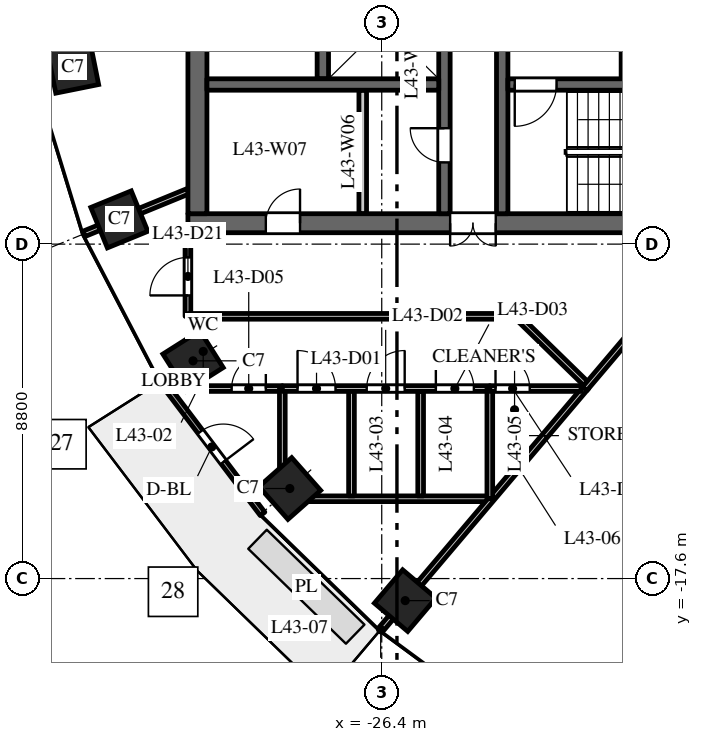
"""IFC4 building model, lengths in metres.
Left out: names, types, materials, properties, quantities, classifications, styles, units other than length and angle.
Written with IfcOpenShell. Run it as: python <this file> out.ifc"""

import sys

from ifc_helpers import new_model, si_unit, direction, frame, frame_2d, origin, origin_2d, place, context, subcontext, project, spatial, rectangle, extrude, element, fill, save


model = new_model("IFC4")
c1 = context("Model", 3, precision=1e-05, world=origin(), true_north=direction((0.0, 1.0)))
c2 = subcontext(c1, "Body", "Model", "MODEL_VIEW")
j1 = project(units=[si_unit("LENGTHUNIT", "METRE"), si_unit("PLANEANGLEUNIT", "RADIAN")], contexts=[c1])
p1 = place(None, origin())
s1 = spatial("IfcSite", under=j1, at=p1, CompositionType="ELEMENT")
p2 = place(p1, origin())
s2 = spatial("IfcBuilding", under=s1, at=p2, CompositionType="ELEMENT")
p3 = place(p2, frame((0.0, 0.0, 186.0)))
s3 = spatial("IfcBuildingStorey", under=s2, at=p3, CompositionType="ELEMENT", Elevation=186.0)
for number, where, z_axis, x_axis in (
    (1, (-34.527, -4.151, 0.0), (0.0, 0.0, 1.0), (0.197, -0.98, 0.0)),
    (2, (-33.305, -8.149, 0.0), (0.0, 0.0, 1.0), (0.379, -0.925, 0.0)),
    (3, (-31.365, -11.871, 0.0), (0.0, 0.0, 1.0), (0.535, -0.845, 0.0)),
    (4, (-28.819, -15.23, 0.0), (0.0, 0.0, 1.0), (0.663, -0.749, 0.0)),
    (5, (-25.783, -18.18, 0.0), (0.0, 0.0, 1.0), (0.763, -0.646, 0.0)),
):
    element("IfcColumn", number, at=place(p3, frame(where, z_axis=z_axis, x_axis=x_axis)), inside=s3, PredefinedType="COLUMN", context=c2, shape_type="SweptSolid", body=[
        extrude(rectangle(XDim=1.15, YDim=1.15, at=origin_2d()), origin(), (0.0, 0.0, 1.0), 4.0),
    ])
p4 = place(p3, frame((-16.5, -8.25, 0.0), z_axis=(0.0, 0.0, 1.0), x_axis=(-1.0, 0.0, 0.0)))
e6 = element("IfcWall", 6, at=p4, inside=s3, PredefinedType="SHEAR", context=c2, shape_type="SweptSolid", body=[
    extrude(rectangle(XDim=15.0, YDim=0.5, at=frame_2d((7.5, 0.0))), origin(), (0.0, 0.0, 1.0), 3.7),
])
p5 = place(p4, frame((6.9, 0.0, 0.0)))
e7 = element("IfcOpeningElement", 7, at=p5, cuts=e6, PredefinedType="OPENING", context=c2, shape_type="SweptSolid", body=[
    extrude(rectangle(XDim=1.2, YDim=2.1, at=frame_2d((0.6, 1.05))), frame((0.0, 0.26, 0.0), z_axis=(0.0, -1.0, 0.0), x_axis=(1.0, 0.0, 0.0)), (0.0, 0.0, 1.0), 0.52),
])
p6 = place(p4, frame((12.05, 0.0, 0.0)))
e8 = element("IfcOpeningElement", 8, at=p6, cuts=e6, PredefinedType="OPENING", context=c2, shape_type="SweptSolid", body=[
    extrude(rectangle(XDim=0.9, YDim=2.1, at=frame_2d((0.45, 1.05))), frame((0.0, 0.26, 0.0), z_axis=(0.0, -1.0, 0.0), x_axis=(1.0, 0.0, 0.0)), (0.0, 0.0, 1.0), 0.52),
])
p7 = place(p3, frame((-27.95, -4.45, 0.0), z_axis=(0.0, 0.0, 1.0), x_axis=(0.0, 1.0, 0.0)))
e9 = element("IfcWall", 9, at=p7, inside=s3, PredefinedType="SHEAR", context=c2, shape_type="SweptSolid", body=[
    extrude(rectangle(XDim=8.9, YDim=0.3, at=frame_2d((4.45, 0.0))), origin(), (0.0, 0.0, 1.0), 3.7),
])
p8 = place(p3, frame((-19.95, -4.45, 0.0), z_axis=(0.0, 0.0, 1.0), x_axis=(0.0, 1.0, 0.0)))
e10 = element("IfcWall", 10, at=p8, inside=s3, PredefinedType="SHEAR", context=c2, shape_type="SweptSolid", body=[
    extrude(rectangle(XDim=8.9, YDim=0.3, at=frame_2d((4.45, 0.0))), origin(), (0.0, 0.0, 1.0), 3.7),
])
p9 = place(p8, frame((0.775, 0.0, 0.0)))
e11 = element("IfcOpeningElement", 11, at=p9, cuts=e10, PredefinedType="OPENING", context=c2, shape_type="SweptSolid", body=[
    extrude(rectangle(XDim=1.2, YDim=2.1, at=frame_2d((0.6, 1.05))), frame((0.0, 0.16, 0.0), z_axis=(0.0, -1.0, 0.0), x_axis=(1.0, 0.0, 0.0)), (0.0, 0.0, 1.0), 0.32),
])
p10 = place(p8, frame((7.25, 0.0, 0.0)))
e12 = element("IfcOpeningElement", 12, at=p10, cuts=e10, PredefinedType="OPENING", context=c2, shape_type="SweptSolid", body=[
    extrude(rectangle(XDim=1.1, YDim=2.1, at=frame_2d((0.55, 1.05))), frame((0.0, 0.16, 0.0), z_axis=(0.0, -1.0, 0.0), x_axis=(1.0, 0.0, 0.0)), (0.0, 0.0, 1.0), 0.32),
])
p11 = place(p3, frame((-24.75, -8.0, 0.0), z_axis=(0.0, 0.0, 1.0), x_axis=(0.0, 1.0, 0.0)))
e13 = element("IfcWall", 13, at=p11, inside=s3, PredefinedType="SHEAR", context=c2, shape_type="SweptSolid", body=[
    extrude(rectangle(XDim=16.0, YDim=0.3, at=frame_2d((8.0, 0.0))), origin(), (0.0, 0.0, 1.0), 3.7),
])
p12 = place(p11, frame((4.425, 0.0, 0.0)))
e14 = element("IfcOpeningElement", 14, at=p12, cuts=e13, PredefinedType="OPENING", context=c2, shape_type="SweptSolid", body=[
    extrude(rectangle(XDim=1.1, YDim=2.1, at=frame_2d((0.55, 1.05))), frame((0.0, 0.16, 0.0), z_axis=(0.0, -1.0, 0.0), x_axis=(1.0, 0.0, 0.0)), (0.0, 0.0, 1.0), 0.32),
])
p13 = place(p11, frame((7.45, 0.0, 0.0)))
e15 = element("IfcOpeningElement", 15, at=p13, cuts=e13, PredefinedType="OPENING", context=c2, shape_type="SweptSolid", body=[
    extrude(rectangle(XDim=1.1, YDim=2.1, at=frame_2d((0.55, 1.05))), frame((0.0, 0.16, 0.0), z_axis=(0.0, -1.0, 0.0), x_axis=(1.0, 0.0, 0.0)), (0.0, 0.0, 1.0), 0.32),
])
p14 = place(p11, frame((10.475, 0.0, 0.0)))
e16 = element("IfcOpeningElement", 16, at=p14, cuts=e13, PredefinedType="OPENING", context=c2, shape_type="SweptSolid", body=[
    extrude(rectangle(XDim=1.1, YDim=2.1, at=frame_2d((0.55, 1.05))), frame((0.0, 0.16, 0.0), z_axis=(0.0, -1.0, 0.0), x_axis=(1.0, 0.0, 0.0)), (0.0, 0.0, 1.0), 0.32),
])
p15 = place(p11, frame((13.75, 0.0, 0.0)))
e17 = element("IfcOpeningElement", 17, at=p15, cuts=e13, PredefinedType="OPENING", context=c2, shape_type="SweptSolid", body=[
    extrude(rectangle(XDim=0.9, YDim=2.1, at=frame_2d((0.45, 1.05))), frame((0.0, 0.16, 0.0), z_axis=(0.0, -1.0, 0.0), x_axis=(1.0, 0.0, 0.0)), (0.0, 0.0, 1.0), 0.32),
])
p16 = place(p11, frame((1.35, 0.0, 0.0)))
e18 = element("IfcOpeningElement", 18, at=p16, cuts=e13, PredefinedType="OPENING", context=c2, shape_type="SweptSolid", body=[
    extrude(rectangle(XDim=0.9, YDim=2.1, at=frame_2d((0.45, 1.05))), frame((0.0, 0.16, 0.0), z_axis=(0.0, -1.0, 0.0), x_axis=(1.0, 0.0, 0.0)), (0.0, 0.0, 1.0), 0.32),
])
p17 = place(p3, frame((-31.25, -8.0, 0.0), z_axis=(0.0, 0.0, 1.0), x_axis=(0.0, 1.0, 0.0)))
e19 = element("IfcWall", 19, at=p17, inside=s3, PredefinedType="SHEAR", context=c2, shape_type="SweptSolid", body=[
    extrude(rectangle(XDim=16.0, YDim=0.5, at=frame_2d((8.0, 0.0))), origin(), (0.0, 0.0, 1.0), 3.7),
])
p18 = place(p3, frame((-26.9, -8.0, 0.0), z_axis=(0.0, 0.0, 1.0), x_axis=(0.0, 1.0, 0.0)))
e20 = element("IfcWall", 20, at=p18, inside=s3, PredefinedType="PARTITIONING", context=c2, shape_type="SweptSolid", body=[
    extrude(rectangle(XDim=3.25, YDim=0.2, at=frame_2d((1.625, 0.0))), origin(), (0.0, 0.0, 1.0), 3.7),
])
p19 = place(p3, frame((-24.9, -4.6, 0.0), z_axis=(0.0, 0.0, 1.0), x_axis=(-1.0, 0.0, 0.0)))
e21 = element("IfcWall", 21, at=p19, inside=s3, PredefinedType="SHEAR", context=c2, shape_type="SweptSolid", body=[
    extrude(rectangle(XDim=6.1, YDim=0.3, at=frame_2d((3.05, 0.0))), origin(), (0.0, 0.0, 1.0), 3.7),
])
p20 = place(p3, frame((-23.23, -8.0, 0.0), z_axis=(0.0, 0.0, 1.0), x_axis=(0.0, 1.0, 0.0)))
e22 = element("IfcWall", 22, at=p20, inside=s3, PredefinedType="SHEAR", context=c2, shape_type="SweptSolid", body=[
    extrude(rectangle(XDim=7.875, YDim=0.3, at=frame_2d((3.938, 0.0))), origin(), (0.0, 0.0, 1.0), 3.7),
])
p21 = place(p20, frame((5.15, 0.0, 0.0)))
e23 = element("IfcOpeningElement", 23, at=p21, cuts=e22, PredefinedType="OPENING", context=c2, shape_type="SweptSolid", body=[
    extrude(rectangle(XDim=1.1, YDim=2.1, at=frame_2d((0.55, 1.05))), frame((0.0, 0.16, 0.0), z_axis=(0.0, -1.0, 0.0), x_axis=(1.0, 0.0, 0.0)), (0.0, 0.0, 1.0), 0.32),
])
p22 = place(p3, frame((-16.9, -4.6, 0.0), z_axis=(0.0, 0.0, 1.0), x_axis=(-1.0, 0.0, 0.0)))
e24 = element("IfcWall", 24, at=p22, inside=s3, PredefinedType="SHEAR", context=c2, shape_type="SweptSolid", body=[
    extrude(rectangle(XDim=6.18, YDim=0.3, at=frame_2d((3.09, 0.0))), origin(), (0.0, 0.0, 1.0), 3.7),
])
p23 = place(p22, frame((4.9, 0.0, 0.0)))
e25 = element("IfcOpeningElement", 25, at=p23, cuts=e24, PredefinedType="OPENING", context=c2, shape_type="SweptSolid", body=[
    extrude(rectangle(XDim=1.1, YDim=2.1, at=frame_2d((0.55, 1.05))), frame((0.0, 0.16, 0.0), z_axis=(0.0, -1.0, 0.0), x_axis=(1.0, 0.0, 0.0)), (0.0, 0.0, 1.0), 0.32),
])
p24 = place(p3, frame((-32.208, -12.374, 0.0), z_axis=(0.0, 0.0, 1.0), x_axis=(0.604045763106, -0.796949632081, 0.0)))
e26 = element("IfcWall", 26, at=p24, inside=s3, PredefinedType="STANDARD", context=c2, shape_type="SweptSolid", body=[
    extrude(rectangle(XDim=4.423, YDim=0.15, at=frame_2d((2.212, 0.0))), origin(), (0.0, 0.0, 1.0), 3.7),
])
p25 = place(p24, frame((1.712, 0.0, 0.0)))
e27 = element("IfcOpeningElement", 27, at=p25, cuts=e26, PredefinedType="OPENING", context=c2, shape_type="SweptSolid", body=[
    extrude(rectangle(XDim=1.0, YDim=2.4, at=frame_2d((0.5, 1.2))), frame((0.0, 0.085, 0.0), z_axis=(0.0, -1.0, 0.0), x_axis=(1.0, 0.0, 0.0)), (0.0, 0.0, 1.0), 0.17),
])
p26 = place(p3, frame((-34.234, -8.53, 0.0), z_axis=(0.0, 0.0, 1.0), x_axis=(0.925344112436, 0.379128307542, 0.0)))
e28 = element("IfcWall", 28, at=p26, inside=s3, PredefinedType="PARTITIONING", context=c2, shape_type="SweptSolid", body=[
    extrude(rectangle(XDim=2.954, YDim=0.15, at=frame_2d((1.477, 0.0))), origin(), (0.0, 0.0, 1.0), 2.9),
])
p27 = place(p3, frame((-32.063, -12.6, 0.0), z_axis=(0.0, 0.0, 1.0), x_axis=(1.0, 0.0, 0.0)))
e29 = element("IfcWall", 29, at=p27, inside=s3, PredefinedType="PARTITIONING", context=c2, shape_type="SweptSolid", body=[
    extrude(rectangle(XDim=3.047, YDim=0.15, at=frame_2d((1.523, 0.0))), origin(), (0.0, 0.0, 1.0), 2.9),
])
p28 = place(p27, frame((1.713, 0.0, 0.0)))
e30 = element("IfcOpeningElement", 30, at=p28, cuts=e29, PredefinedType="OPENING", context=c2, shape_type="SweptSolid", body=[
    extrude(rectangle(XDim=0.9, YDim=2.1, at=frame_2d((0.45, 1.05))), frame((0.0, 0.085, 0.0), z_axis=(0.0, -1.0, 0.0), x_axis=(1.0, 0.0, 0.0)), (0.0, 0.0, 1.0), 0.17),
])
p29 = place(p3, frame((-31.5, -10.7, 0.0), z_axis=(0.0, 0.0, 1.0), x_axis=(0.0, 1.0, 0.0)))
e31 = element("IfcWall", 31, at=p29, inside=s3, PredefinedType="PARTITIONING", context=c2, shape_type="SweptSolid", body=[
    extrude(rectangle(XDim=2.2, YDim=0.15, at=frame_2d((1.1, 0.0))), origin(), (0.0, 0.0, 1.0), 3.7),
])
p30 = place(p29, frame((0.55, 0.0, 0.0)))
e32 = element("IfcOpeningElement", 32, at=p30, cuts=e31, PredefinedType="OPENING", context=c2, shape_type="SweptSolid", body=[
    extrude(rectangle(XDim=1.0, YDim=2.1, at=frame_2d((0.5, 1.05))), frame((0.0, 0.085, 0.0), z_axis=(0.0, -1.0, 0.0), x_axis=(1.0, 0.0, 0.0)), (0.0, 0.0, 1.0), 0.17),
])
p31 = place(p3, frame((-31.5, -10.7, 0.0), z_axis=(0.0, 0.0, 1.0), x_axis=(1.0, 0.0, 0.0)))
e33 = element("IfcWall", 33, at=p31, inside=s3, PredefinedType="PARTITIONING", context=c2, shape_type="SweptSolid", body=[
    extrude(rectangle(XDim=8.762, YDim=0.15, at=frame_2d((4.381, 0.0))), origin(), (0.0, 0.0, 1.0), 3.1),
])
p32 = place(p3, frame((-29.016, -15.496, 0.0), z_axis=(0.0, 0.0, 1.0), x_axis=(0.0, 1.0, 0.0)))
e34 = element("IfcWall", 34, at=p32, inside=s3, PredefinedType="PARTITIONING", context=c2, shape_type="SweptSolid", body=[
    extrude(rectangle(XDim=2.896, YDim=0.15, at=frame_2d((1.448, 0.0))), origin(), (0.0, 0.0, 1.0), 2.9),
])
p33 = place(p3, frame((-29.016, -12.6, 0.0), z_axis=(0.0, 0.0, 1.0), x_axis=(1.0, 0.0, 0.0)))
e35 = element("IfcWall", 35, at=p33, inside=s3, PredefinedType="PARTITIONING", context=c2, shape_type="SweptSolid", body=[
    extrude(rectangle(XDim=5.46, YDim=0.15, at=frame_2d((2.73, 0.0))), origin(), (0.0, 0.0, 1.0), 3.7),
])
p34 = place(p33, frame((0.4, 0.0, 0.0)))
e36 = element("IfcOpeningElement", 36, at=p34, cuts=e35, PredefinedType="OPENING", context=c2, shape_type="SweptSolid", body=[
    extrude(rectangle(XDim=1.0, YDim=2.1, at=frame_2d((0.5, 1.05))), frame((0.0, 0.085, 0.0), z_axis=(0.0, -1.0, 0.0), x_axis=(1.0, 0.0, 0.0)), (0.0, 0.0, 1.0), 0.17),
])
p35 = place(p33, frame((2.22, 0.0, 0.0)))
e37 = element("IfcOpeningElement", 37, at=p35, cuts=e35, PredefinedType="OPENING", context=c2, shape_type="SweptSolid", body=[
    extrude(rectangle(XDim=1.0, YDim=2.1, at=frame_2d((0.5, 1.05))), frame((0.0, 0.085, 0.0), z_axis=(0.0, -1.0, 0.0), x_axis=(1.0, 0.0, 0.0)), (0.0, 0.0, 1.0), 0.17),
])
p36 = place(p33, frame((4.04, 0.0, 0.0)))
e38 = element("IfcOpeningElement", 38, at=p36, cuts=e35, PredefinedType="OPENING", context=c2, shape_type="SweptSolid", body=[
    extrude(rectangle(XDim=1.0, YDim=2.1, at=frame_2d((0.5, 1.05))), frame((0.0, 0.085, 0.0), z_axis=(0.0, -1.0, 0.0), x_axis=(1.0, 0.0, 0.0)), (0.0, 0.0, 1.0), 0.17),
])
p37 = place(p3, frame((-29.012, -15.5, 0.0), z_axis=(0.0, 0.0, 1.0), x_axis=(1.0, 0.0, 0.0)))
e39 = element("IfcWall", 39, at=p37, inside=s3, PredefinedType="PARTITIONING", context=c2, shape_type="SweptSolid", body=[
    extrude(rectangle(XDim=5.456, YDim=0.15, at=frame_2d((2.728, 0.0))), origin(), (0.0, 0.0, 1.0), 2.9),
])
p38 = place(p3, frame((-27.196, -15.425, 0.0), z_axis=(0.0, 0.0, 1.0), x_axis=(0.0, 1.0, 0.0)))
e40 = element("IfcWall", 40, at=p38, inside=s3, PredefinedType="PARTITIONING", context=c2, shape_type="SweptSolid", body=[
    extrude(rectangle(XDim=2.75, YDim=0.15, at=frame_2d((1.375, 0.0))), origin(), (0.0, 0.0, 1.0), 3.7),
])
p39 = place(p3, frame((-26.428, -18.946, 0.0), z_axis=(0.0, 0.0, 1.0), x_axis=(0.646259235329, 0.763117946816, 0.0)))
e41 = element("IfcWall", 41, at=p39, inside=s3, PredefinedType="PARTITIONING", context=c2, shape_type="SweptSolid", body=[
    extrude(rectangle(XDim=8.388, YDim=0.15, at=frame_2d((4.194, 0.0))), origin(), (0.0, 0.0, 1.0), 2.75),
])
p40 = place(p3, frame((-25.376, -15.425, 0.0), z_axis=(0.0, 0.0, 1.0), x_axis=(0.0, 1.0, 0.0)))
e42 = element("IfcWall", 42, at=p40, inside=s3, PredefinedType="PARTITIONING", context=c2, shape_type="SweptSolid", body=[
    extrude(rectangle(XDim=2.75, YDim=0.15, at=frame_2d((1.375, 0.0))), origin(), (0.0, 0.0, 1.0), 3.7),
])
p41 = place(p3, frame((-23.556, -15.5, 0.0), z_axis=(0.0, 0.0, 1.0), x_axis=(0.0, 1.0, 0.0)))
e43 = element("IfcWall", 43, at=p41, inside=s3, PredefinedType="PARTITIONING", context=c2, shape_type="SweptSolid", body=[
    extrude(rectangle(XDim=2.9, YDim=0.15, at=frame_2d((1.45, 0.0))), origin(), (0.0, 0.0, 1.0), 3.7),
])
p42 = place(p3, frame((-23.556, -12.6, 0.0), z_axis=(0.0, 0.0, 1.0), x_axis=(1.0, 0.0, 0.0)))
e44 = element("IfcWall", 44, at=p42, inside=s3, PredefinedType="PARTITIONING", context=c2, shape_type="SweptSolid", body=[
    extrude(rectangle(XDim=2.4, YDim=0.15, at=frame_2d((1.2, 0.0))), origin(), (0.0, 0.0, 1.0), 3.7),
])
p43 = place(p42, frame((0.15, 0.0, 0.0)))
e45 = element("IfcOpeningElement", 45, at=p43, cuts=e44, PredefinedType="OPENING", context=c2, shape_type="SweptSolid", body=[
    extrude(rectangle(XDim=0.9, YDim=2.1, at=frame_2d((0.45, 1.05))), frame((0.0, 0.085, 0.0), z_axis=(0.0, -1.0, 0.0), x_axis=(1.0, 0.0, 0.0)), (0.0, 0.0, 1.0), 0.17),
])
p44 = place(p3, frame((-22.765, -10.778, 0.0), z_axis=(0.0, 0.0, 1.0), x_axis=(0.716199777284, -0.69789532096, 0.0)))
e46 = element("IfcWall", 46, at=p44, inside=s3, PredefinedType="PARTITIONING", context=c2, shape_type="SweptSolid", body=[
    extrude(rectangle(XDim=2.414, YDim=0.15, at=frame_2d((1.207, 0.0))), origin(), (0.0, 0.0, 1.0), 3.7),
])
p45 = place(p3, frame((-21.058, -12.605, 0.0), z_axis=(0.0, 0.0, 1.0), x_axis=(0.646427819344, 0.762975146632, 0.0)))
e47 = element("IfcWall", 47, at=p45, inside=s3, PredefinedType="PARTITIONING", context=c2, shape_type="SweptSolid", body=[
    extrude(rectangle(XDim=2.591, YDim=0.15, at=frame_2d((1.296, 0.0))), origin(), (0.0, 0.0, 1.0), 3.7),
])
p46 = place(p23, origin())
e48 = element("IfcDoor", 48, at=p46, inside=s3, OperationType="SINGLE_SWING_LEFT", PredefinedType="DOOR", context=c2, shape_type="SweptSolid", body=[
    extrude(rectangle(XDim=1.1, YDim=2.1, at=frame_2d((0.55, 1.05))), frame((0.0, 0.025, 0.0), z_axis=(0.0, -1.0, 0.0), x_axis=(1.0, 0.0, 0.0)), (0.0, 0.0, 1.0), 0.05),
])
fill(e25, e48)
p47 = place(p5, origin())
e49 = element("IfcDoor", 49, at=p47, inside=s3, OperationType="DOUBLE_DOOR_DOUBLE_SWING", PredefinedType="DOOR", context=c2, shape_type="SweptSolid", body=[
    extrude(rectangle(XDim=1.2, YDim=2.1, at=frame_2d((0.6, 1.05))), frame((0.0, 0.025, 0.0), z_axis=(0.0, -1.0, 0.0), x_axis=(1.0, 0.0, 0.0)), (0.0, 0.0, 1.0), 0.05),
])
fill(e7, e49)
p48 = place(p16, origin())
e50 = element("IfcDoor", 50, at=p48, inside=s3, OperationType="SINGLE_SWING_LEFT", PredefinedType="DOOR", context=c2, shape_type="SweptSolid", body=[
    extrude(rectangle(XDim=0.9, YDim=2.1, at=frame_2d((0.45, 1.05))), frame((0.0, 0.025, 0.0), z_axis=(0.0, -1.0, 0.0), x_axis=(1.0, 0.0, 0.0)), (0.0, 0.0, 1.0), 0.05),
])
fill(e18, e50)
p49 = place(p6, origin())
e51 = element("IfcDoor", 51, at=p49, inside=s3, OperationType="SINGLE_SWING_LEFT", PredefinedType="DOOR", context=c2, shape_type="SweptSolid", body=[
    extrude(rectangle(XDim=0.9, YDim=2.1, at=frame_2d((0.45, 1.05))), frame((0.0, 0.025, 0.0), z_axis=(0.0, -1.0, 0.0), x_axis=(1.0, 0.0, 0.0)), (0.0, 0.0, 1.0), 0.05),
])
fill(e8, e51)
p50 = place(p25, origin())
e52 = element("IfcDoor", 52, at=p50, inside=s3, OperationType="SINGLE_SWING_RIGHT", PredefinedType="DOOR", context=c2, shape_type="SweptSolid", body=[
    extrude(rectangle(XDim=1.0, YDim=2.4, at=frame_2d((0.5, 1.2))), frame((0.0, 0.025, 0.0), z_axis=(0.0, -1.0, 0.0), x_axis=(1.0, 0.0, 0.0)), (0.0, 0.0, 1.0), 0.05),
])
fill(e27, e52)
p51 = place(p34, origin())
e53 = element("IfcDoor", 53, at=p51, inside=s3, OperationType="SINGLE_SWING_LEFT", PredefinedType="DOOR", context=c2, shape_type="SweptSolid", body=[
    extrude(rectangle(XDim=1.0, YDim=2.1, at=frame_2d((0.5, 1.05))), frame((0.0, 0.025, 0.0), z_axis=(0.0, -1.0, 0.0), x_axis=(1.0, 0.0, 0.0)), (0.0, 0.0, 1.0), 0.05),
])
fill(e36, e53)
p52 = place(p35, origin())
e54 = element("IfcDoor", 54, at=p52, inside=s3, OperationType="SINGLE_SWING_RIGHT", PredefinedType="DOOR", context=c2, shape_type="SweptSolid", body=[
    extrude(rectangle(XDim=1.0, YDim=2.1, at=frame_2d((0.5, 1.05))), frame((0.0, 0.025, 0.0), z_axis=(0.0, -1.0, 0.0), x_axis=(1.0, 0.0, 0.0)), (0.0, 0.0, 1.0), 0.05),
])
fill(e37, e54)
p53 = place(p36, origin())
e55 = element("IfcDoor", 55, at=p53, inside=s3, OperationType="SINGLE_SWING_LEFT", PredefinedType="DOOR", context=c2, shape_type="SweptSolid", body=[
    extrude(rectangle(XDim=1.0, YDim=2.1, at=frame_2d((0.5, 1.05))), frame((0.0, 0.025, 0.0), z_axis=(0.0, -1.0, 0.0), x_axis=(1.0, 0.0, 0.0)), (0.0, 0.0, 1.0), 0.05),
])
fill(e38, e55)
p54 = place(p43, origin())
e56 = element("IfcDoor", 56, at=p54, inside=s3, OperationType="SINGLE_SWING_LEFT", PredefinedType="DOOR", context=c2, shape_type="SweptSolid", body=[
    extrude(rectangle(XDim=0.9, YDim=2.1, at=frame_2d((0.45, 1.05))), frame((0.0, 0.025, 0.0), z_axis=(0.0, -1.0, 0.0), x_axis=(1.0, 0.0, 0.0)), (0.0, 0.0, 1.0), 0.05),
])
fill(e45, e56)
p55 = place(p28, origin())
e57 = element("IfcDoor", 57, at=p55, inside=s3, OperationType="SINGLE_SWING_RIGHT", PredefinedType="DOOR", context=c2, shape_type="SweptSolid", body=[
    extrude(rectangle(XDim=0.9, YDim=2.1, at=frame_2d((0.45, 1.05))), frame((0.0, 0.025, 0.0), z_axis=(0.0, -1.0, 0.0), x_axis=(1.0, 0.0, 0.0)), (0.0, 0.0, 1.0), 0.05),
])
fill(e30, e57)
p56 = place(p30, origin())
e58 = element("IfcDoor", 58, at=p56, inside=s3, OperationType="SINGLE_SWING_LEFT", PredefinedType="DOOR", context=c2, shape_type="SweptSolid", body=[
    extrude(rectangle(XDim=1.0, YDim=2.1, at=frame_2d((0.5, 1.05))), frame((0.0, 0.025, 0.0), z_axis=(0.0, -1.0, 0.0), x_axis=(1.0, 0.0, 0.0)), (0.0, 0.0, 1.0), 0.05),
])
fill(e32, e58)
save(model, sys.argv[1])
